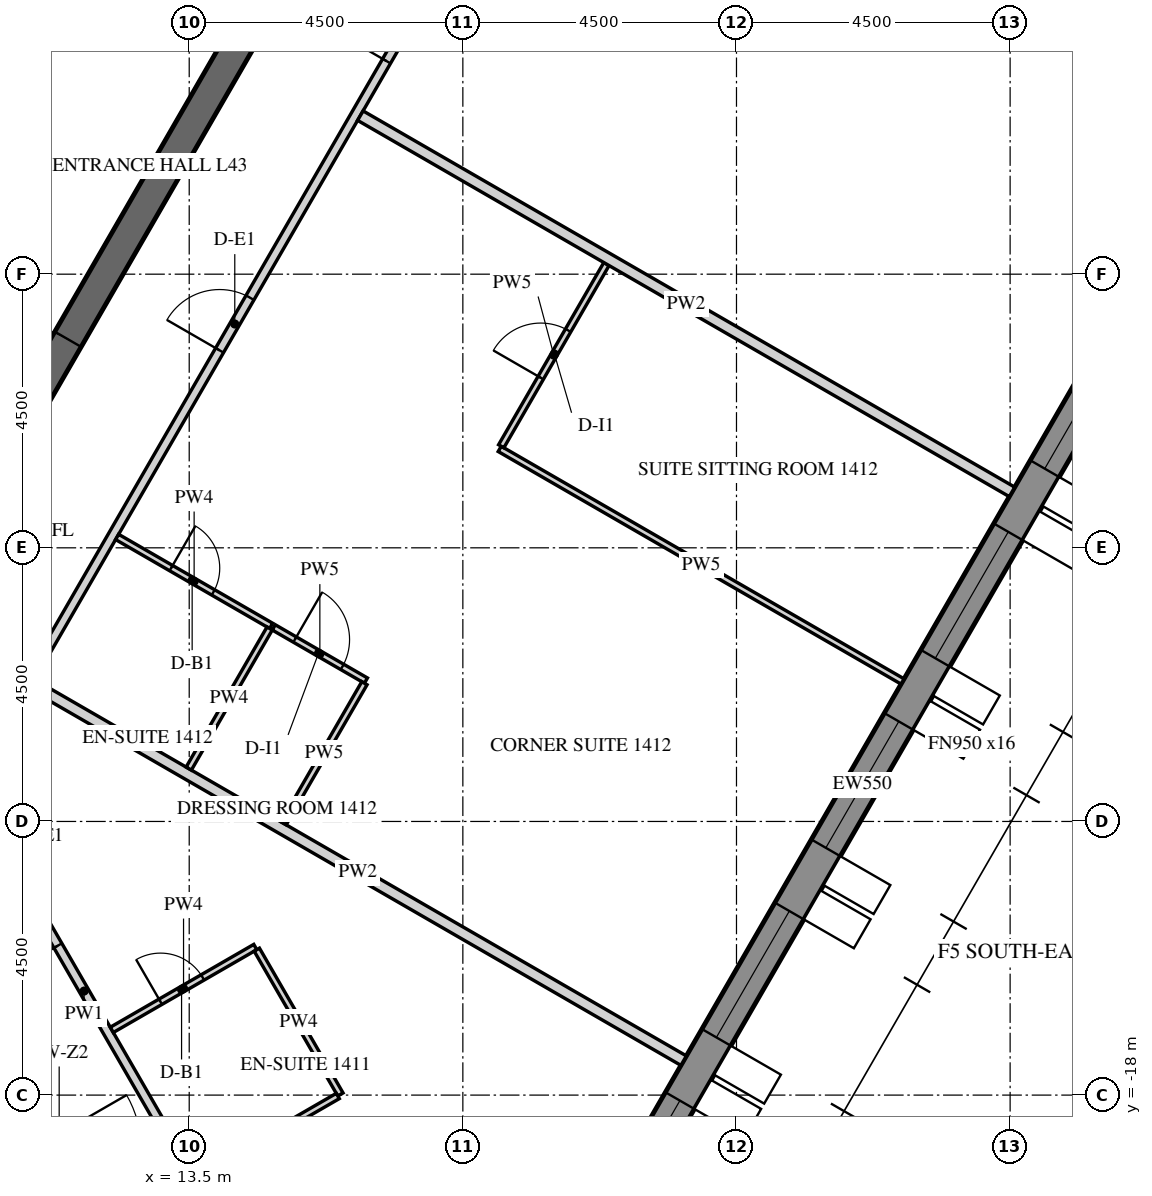
"""IFC4 building model, lengths in metres.
Left out: names, types, materials, properties, quantities, classifications, styles, units other than length and angle.
Written with IfcOpenShell. Run it as: python <this file> out.ifc"""

import sys

from ifc_helpers import new_model, si_unit, direction, frame, frame_2d, origin, place, context, subcontext, project, spatial, polyline, rectangle, outline, extrude, element, fill, save


model = new_model("IFC4")
c1 = context("Model", 3, precision=1e-05, world=origin(), true_north=direction((0.0, 1.0)))
c2 = subcontext(c1, "Body", "Model", "MODEL_VIEW")
j1 = project(units=[si_unit("LENGTHUNIT", "METRE"), si_unit("PLANEANGLEUNIT", "RADIAN")], contexts=[c1])
p1 = place(None, origin())
s1 = spatial("IfcSite", under=j1, at=p1, CompositionType="ELEMENT")
p2 = place(p1, origin())
s2 = spatial("IfcBuilding", under=s1, at=p2, CompositionType="ELEMENT")
p3 = place(p2, frame((0.0, 0.0, 183.9)))
s3 = spatial("IfcBuildingStorey", under=s2, at=p3, CompositionType="ELEMENT", Elevation=183.9)
p4 = place(p3, frame((17.63, -24.914, -0.15), z_axis=(0.0, 0.0, 1.0), x_axis=(0.499998569178, 0.866026229868, 0.0)))
e1 = element("IfcWall", 1, at=p4, inside=s3, PredefinedType="SOLIDWALL", context=c2, shape_type="SweptSolid", body=[
    extrude(outline(polyline([(-0.022, -0.275), (27.783, -0.275), (27.732, 0.275), (0.022, 0.275), (-0.022, -0.275)])), origin(), (0.0, 0.0, 1.0), 3.9),
])
p5 = place(p4, frame((1.879, 0.0, 1.05)))
e2 = element("IfcOpeningElement", 2, at=p5, cuts=e1, PredefinedType="OPENING", context=c2, shape_type="SweptSolid", body=[
    extrude(rectangle(XDim=2.4, YDim=2.4, at=frame_2d((1.2, 1.2))), frame((0.0, 0.285, 0.0), z_axis=(0.0, -1.0, 0.0), x_axis=(1.0, 0.0, 0.0)), (0.0, 0.0, 1.0), 0.57),
])
p6 = place(p4, frame((5.479, 0.0, 1.05)))
e3 = element("IfcOpeningElement", 3, at=p6, cuts=e1, PredefinedType="OPENING", context=c2, shape_type="SweptSolid", body=[
    extrude(rectangle(XDim=2.4, YDim=2.4, at=frame_2d((1.2, 1.2))), frame((0.0, 0.285, 0.0), z_axis=(0.0, -1.0, 0.0), x_axis=(1.0, 0.0, 0.0)), (0.0, 0.0, 1.0), 0.57),
])
p7 = place(p4, frame((9.079, 0.0, 1.05)))
e4 = element("IfcOpeningElement", 4, at=p7, cuts=e1, PredefinedType="OPENING", context=c2, shape_type="SweptSolid", body=[
    extrude(rectangle(XDim=2.4, YDim=2.4, at=frame_2d((1.2, 1.2))), frame((0.0, 0.285, 0.0), z_axis=(0.0, -1.0, 0.0), x_axis=(1.0, 0.0, 0.0)), (0.0, 0.0, 1.0), 0.57),
])
p8 = place(p4, frame((12.679, 0.0, 1.05)))
e5 = element("IfcOpeningElement", 5, at=p8, cuts=e1, PredefinedType="OPENING", context=c2, shape_type="SweptSolid", body=[
    extrude(rectangle(XDim=2.4, YDim=2.4, at=frame_2d((1.2, 1.2))), frame((0.0, 0.285, 0.0), z_axis=(0.0, -1.0, 0.0), x_axis=(1.0, 0.0, 0.0)), (0.0, 0.0, 1.0), 0.57),
])
p9 = place(p4, frame((16.279, 0.0, 1.05)))
e6 = element("IfcOpeningElement", 6, at=p9, cuts=e1, PredefinedType="OPENING", context=c2, shape_type="SweptSolid", body=[
    extrude(rectangle(XDim=2.4, YDim=2.4, at=frame_2d((1.2, 1.2))), frame((0.0, 0.285, 0.0), z_axis=(0.0, -1.0, 0.0), x_axis=(1.0, 0.0, 0.0)), (0.0, 0.0, 1.0), 0.57),
])
p10 = place(p4, frame((19.879, 0.0, 1.05)))
e7 = element("IfcOpeningElement", 7, at=p10, cuts=e1, PredefinedType="OPENING", context=c2, shape_type="SweptSolid", body=[
    extrude(rectangle(XDim=2.4, YDim=2.4, at=frame_2d((1.2, 1.2))), frame((0.0, 0.285, 0.0), z_axis=(0.0, -1.0, 0.0), x_axis=(1.0, 0.0, 0.0)), (0.0, 0.0, 1.0), 0.57),
])
p11 = place(p4, frame((23.479, 0.0, 1.05)))
e8 = element("IfcOpeningElement", 8, at=p11, cuts=e1, PredefinedType="OPENING", context=c2, shape_type="SweptSolid", body=[
    extrude(rectangle(XDim=2.4, YDim=2.4, at=frame_2d((1.2, 1.2))), frame((0.0, 0.285, 0.0), z_axis=(0.0, -1.0, 0.0), x_axis=(1.0, 0.0, 0.0)), (0.0, 0.0, 1.0), 0.57),
])
p12 = place(p3, frame((7.361, -12.75, -0.15), z_axis=(0.0, 0.0, 1.0), x_axis=(0.50000571537, 0.866022103989, 0.0)))
e9 = element("IfcWall", 9, at=p12, inside=s3, PredefinedType="SHEAR", context=c2, shape_type="SweptSolid", body=[
    extrude(outline(polyline([(-0.144, -0.25), (14.867, -0.25), (14.578, 0.25), (0.144, 0.25), (-0.144, -0.25)])), origin(), (0.0, 0.0, 1.0), 3.9),
])
p13 = place(p12, frame((6.49, 0.0, 0.15)))
e10 = element("IfcOpeningElement", 10, at=p13, cuts=e9, PredefinedType="OPENING", context=c2, shape_type="SweptSolid", body=[
    extrude(rectangle(XDim=1.8, YDim=2.4, at=frame_2d((0.9, 1.2))), frame((0.0, 0.26, 0.0), z_axis=(0.0, -1.0, 0.0), x_axis=(1.0, 0.0, 0.0)), (0.0, 0.0, 1.0), 0.52),
])
p14 = place(p3, frame((7.506, -13.0, -0.15), z_axis=(0.0, 0.0, 1.0), x_axis=(0.499988271576, -0.866032175087, 0.0)))
e11 = element("IfcWall", 11, at=p14, inside=s3, PredefinedType="SHEAR", context=c2, shape_type="SweptSolid", body=[
    extrude(rectangle(XDim=15.424, YDim=0.5, at=frame_2d((7.712, 0.0))), origin(), (0.0, 0.0, 1.0), 3.9),
])
p15 = place(p14, frame((6.812, 0.0, 0.15)))
e12 = element("IfcOpeningElement", 12, at=p15, cuts=e11, PredefinedType="OPENING", context=c2, shape_type="SweptSolid", body=[
    extrude(rectangle(XDim=1.8, YDim=2.4, at=frame_2d((0.9, 1.2))), frame((0.0, 0.26, 0.0), z_axis=(0.0, -1.0, 0.0), x_axis=(1.0, 0.0, 0.0)), (0.0, 0.0, 1.0), 0.52),
])
p16 = place(p3, frame((5.673, -9.825, -0.15), z_axis=(0.0, 0.0, 1.0), x_axis=(0.499995046907, 0.866028263435, 0.0)))
e13 = element("IfcWall", 13, at=p16, inside=s3, PredefinedType="SHEAR", context=c2, shape_type="SweptSolid", body=[
    extrude(outline(polyline([(-0.101, -0.175), (11.446, -0.175), (11.244, 0.175), (0.101, 0.175), (-0.101, -0.175)])), origin(), (0.0, 0.0, 1.0), 3.9),
])
p17 = place(p16, frame((4.801, 0.0, 0.15)))
e14 = element("IfcOpeningElement", 14, at=p17, cuts=e13, PredefinedType="OPENING", context=c2, shape_type="SweptSolid", body=[
    extrude(rectangle(XDim=1.8, YDim=2.4, at=frame_2d((0.9, 1.2))), frame((0.0, 0.185, 0.0), z_axis=(0.0, -1.0, 0.0), x_axis=(1.0, 0.0, 0.0)), (0.0, 0.0, 1.0), 0.37),
])
p18 = place(p3, frame((13.699, -19.628, 0.0), z_axis=(0.0, 0.0, 1.0), x_axis=(-0.499993780622, 0.866028994514, 0.0)))
e15 = element("IfcWall", 15, at=p18, inside=s3, PredefinedType="PARTITIONING", context=c2, shape_type="SweptSolid", body=[
    extrude(rectangle(XDim=7.711, YDim=0.15, at=frame_2d((3.855, 0.0))), origin(), (0.0, 0.0, 1.0), 2.988),
])
p19 = place(p18, frame((4.718, 0.0, 0.0)))
e16 = element("IfcOpeningElement", 16, at=p19, cuts=e15, PredefinedType="OPENING", context=c2, shape_type="SweptSolid", body=[
    extrude(rectangle(XDim=1.0, YDim=2.1, at=frame_2d((0.5, 1.05))), frame((0.0, 0.085, 0.0), z_axis=(0.0, -1.0, 0.0), x_axis=(1.0, 0.0, 0.0)), (0.0, 0.0, 1.0), 0.17),
])
p20 = place(p3, frame((9.887, -12.875, 0.0), z_axis=(0.0, 0.0, 1.0), x_axis=(0.499998228944, 0.866026426302, 0.0)))
e17 = element("IfcWall", 17, at=p20, inside=s3, PredefinedType="PARTITIONING", context=c2, shape_type="SweptSolid", body=[
    extrude(rectangle(XDim=14.867, YDim=0.15, at=frame_2d((7.433, 0.0))), origin(), (0.0, 0.0, 1.0), 2.988),
])
p21 = place(p20, frame((8.224, 0.0, 0.0)))
e18 = element("IfcOpeningElement", 18, at=p21, cuts=e17, PredefinedType="OPENING", context=c2, shape_type="SweptSolid", body=[
    extrude(rectangle(XDim=1.0, YDim=2.1, at=frame_2d((0.5, 1.05))), frame((0.0, 0.085, 0.0), z_axis=(0.0, -1.0, 0.0), x_axis=(1.0, 0.0, 0.0)), (0.0, 0.0, 1.0), 0.17),
])
p22 = place(p20, frame((13.717, 0.0, 0.0)))
e19 = element("IfcOpeningElement", 19, at=p22, cuts=e17, PredefinedType="OPENING", context=c2, shape_type="SweptSolid", body=[
    extrude(rectangle(XDim=1.0, YDim=2.1, at=frame_2d((0.5, 1.05))), frame((0.0, 0.085, 0.0), z_axis=(0.0, -1.0, 0.0), x_axis=(1.0, 0.0, 0.0)), (0.0, 0.0, 1.0), 0.17),
])
p23 = place(p3, frame((12.227, -16.927, 0.0), z_axis=(0.0, 0.0, 1.0), x_axis=(0.866012511928, 0.500022328685, 0.0)))
e20 = element("IfcWall", 20, at=p23, inside=s3, PredefinedType="PARTITIONING", context=c2, shape_type="SweptSolid", body=[
    extrude(rectangle(XDim=2.725, YDim=0.1, at=frame_2d((1.363, 0.0))), origin(), (0.0, 0.0, 1.0), 2.988),
])
p24 = place(p23, frame((0.925, 0.0, 0.0)))
e21 = element("IfcOpeningElement", 21, at=p24, cuts=e20, PredefinedType="OPENING", context=c2, shape_type="SweptSolid", body=[
    extrude(rectangle(XDim=0.8, YDim=2.1, at=frame_2d((0.4, 1.05))), frame((0.0, 0.06, 0.0), z_axis=(0.0, -1.0, 0.0), x_axis=(1.0, 0.0, 0.0)), (0.0, 0.0, 1.0), 0.12),
])
p25 = place(p3, frame((14.612, -15.608, 0.0), z_axis=(0.0, 0.0, 1.0), x_axis=(0.499996545922, -0.866027397988, 0.0)))
e22 = element("IfcWall", 22, at=p25, inside=s3, PredefinedType="PARTITIONING", context=c2, shape_type="SweptSolid", body=[
    extrude(rectangle(XDim=2.75, YDim=0.1, at=frame_2d((1.375, 0.0))), origin(), (0.0, 0.0, 1.0), 2.988),
])
p26 = place(p3, frame((15.943, -18.015, 0.0), z_axis=(0.0, 0.0, 1.0), x_axis=(-0.866004723184, -0.50003581814, 0.0)))
e23 = element("IfcWall", 23, at=p26, inside=s3, PredefinedType="PARTITIONING", context=c2, shape_type="SweptSolid", body=[
    extrude(rectangle(XDim=2.675, YDim=0.1, at=frame_2d((1.337, 0.0))), origin(), (0.0, 0.0, 1.0), 2.988),
])
p27 = place(p3, frame((21.631, -17.433, 0.0), z_axis=(0.0, 0.0, 1.0), x_axis=(-0.866024931941, 0.500000817256, 0.0)))
e24 = element("IfcWall", 24, at=p27, inside=s3, PredefinedType="PARTITIONING", context=c2, shape_type="SweptSolid", body=[
    extrude(rectangle(XDim=12.375, YDim=0.18, at=frame_2d((6.188, 0.0))), origin(), (0.0, 0.0, 1.0), 2.988),
])
p28 = place(p3, frame((12.314, -8.821, 0.0), z_axis=(0.0, 0.0, 1.0), x_axis=(0.866046596414, -0.499963291492, 0.0)))
e25 = element("IfcWall", 25, at=p28, inside=s3, PredefinedType="PARTITIONING", context=c2, shape_type="SweptSolid", body=[
    extrude(rectangle(XDim=2.925, YDim=0.1, at=frame_2d((1.462, 0.0))), origin(), (0.0, 0.0, 1.0), 2.988),
])
p29 = place(p28, frame((1.025, 0.0, 0.0)))
e26 = element("IfcOpeningElement", 26, at=p29, cuts=e25, PredefinedType="OPENING", context=c2, shape_type="SweptSolid", body=[
    extrude(rectangle(XDim=0.8, YDim=2.1, at=frame_2d((0.4, 1.05))), frame((0.0, 0.06, 0.0), z_axis=(0.0, -1.0, 0.0), x_axis=(1.0, 0.0, 0.0)), (0.0, 0.0, 1.0), 0.12),
])
p30 = place(p3, frame((14.891, -10.309, 0.0), z_axis=(0.0, 0.0, 1.0), x_axis=(0.866036909293, -0.499980071345, 0.0)))
e27 = element("IfcWall", 27, at=p30, inside=s3, PredefinedType="PARTITIONING", context=c2, shape_type="SweptSolid", body=[
    extrude(rectangle(XDim=1.75, YDim=0.1, at=frame_2d((0.875, 0.0))), origin(), (0.0, 0.0, 1.0), 2.988),
])
p31 = place(p30, frame((0.4, 0.0, 0.0)))
e28 = element("IfcOpeningElement", 28, at=p31, cuts=e27, PredefinedType="OPENING", context=c2, shape_type="SweptSolid", body=[
    extrude(rectangle(XDim=0.9, YDim=2.1, at=frame_2d((0.45, 1.05))), frame((0.0, 0.06, 0.0), z_axis=(0.0, -1.0, 0.0), x_axis=(1.0, 0.0, 0.0)), (0.0, 0.0, 1.0), 0.12),
])
p32 = place(p3, frame((16.381, -11.227, 0.0), z_axis=(0.0, 0.0, 1.0), x_axis=(-0.500008456887, -0.866020521143, 0.0)))
e29 = element("IfcWall", 29, at=p32, inside=s3, PredefinedType="PARTITIONING", context=c2, shape_type="SweptSolid", body=[
    extrude(rectangle(XDim=2.66, YDim=0.1, at=frame_2d((1.33, 0.0))), origin(), (0.0, 0.0, 1.0), 2.988),
])
p33 = place(p3, frame((25.231, -11.198, 0.0), z_axis=(0.0, 0.0, 1.0), x_axis=(-0.866033062874, 0.499986733834, 0.0)))
e30 = element("IfcWall", 30, at=p33, inside=s3, PredefinedType="PARTITIONING", context=c2, shape_type="SweptSolid", body=[
    extrude(rectangle(XDim=7.65, YDim=0.1, at=frame_2d((3.825, 0.0))), origin(), (0.0, 0.0, 1.0), 2.988),
])
p34 = place(p3, frame((18.631, -7.33, 0.0), z_axis=(0.0, 0.0, 1.0), x_axis=(0.499978980201, 0.866037539231, 0.0)))
e31 = element("IfcWall", 31, at=p34, inside=s3, PredefinedType="PARTITIONING", context=c2, shape_type="SweptSolid", body=[
    extrude(rectangle(XDim=3.46, YDim=0.1, at=frame_2d((1.73, 0.0))), origin(), (0.0, 0.0, 1.0), 2.988),
])
p35 = place(p34, frame((1.3, 0.0, 0.0)))
e32 = element("IfcOpeningElement", 32, at=p35, cuts=e31, PredefinedType="OPENING", context=c2, shape_type="SweptSolid", body=[
    extrude(rectangle(XDim=0.9, YDim=2.1, at=frame_2d((0.45, 1.05))), frame((0.0, 0.06, 0.0), z_axis=(0.0, -1.0, 0.0), x_axis=(1.0, 0.0, 0.0)), (0.0, 0.0, 1.0), 0.12),
])
p36 = place(p3, frame((27.031, -8.08, 0.0), z_axis=(0.0, 0.0, 1.0), x_axis=(-0.866024931941, 0.500000817256, 0.0)))
e33 = element("IfcWall", 33, at=p36, inside=s3, PredefinedType="PARTITIONING", context=c2, shape_type="SweptSolid", body=[
    extrude(rectangle(XDim=12.375, YDim=0.18, at=frame_2d((6.188, 0.0))), origin(), (0.0, 0.0, 1.0), 2.988),
])
p37 = place(p3, frame((13.492, -12.63, 0.0), z_axis=(0.0, 0.0, 1.0), x_axis=(0.50004820116, 0.865997573043, 0.0)))
e34 = element("IfcWall", 34, at=p37, inside=s3, PredefinedType="PARTITIONING", context=c2, shape_type="SweptSolid", body=[
    extrude(rectangle(XDim=2.66, YDim=0.1, at=frame_2d((1.33, 0.0))), origin(), (0.0, 0.0, 1.0), 2.988),
])
p38 = place(p6, frame((0.0, 0.205, 0.0)))
e35 = element("IfcWindow", 35, at=p38, inside=s3, PartitioningType="DOUBLE_PANEL_VERTICAL", PredefinedType="WINDOW", context=c2, shape_type="SweptSolid", body=[
    extrude(rectangle(XDim=2.4, YDim=2.4, at=frame_2d((1.2, 1.2))), frame((0.0, 0.03, 0.0), z_axis=(0.0, -1.0, 0.0), x_axis=(1.0, 0.0, 0.0)), (0.0, 0.0, 1.0), 0.06),
])
fill(e3, e35)
p39 = place(p7, frame((0.0, 0.205, 0.0)))
e36 = element("IfcWindow", 36, at=p39, inside=s3, PartitioningType="DOUBLE_PANEL_VERTICAL", PredefinedType="WINDOW", context=c2, shape_type="SweptSolid", body=[
    extrude(rectangle(XDim=2.4, YDim=2.4, at=frame_2d((1.2, 1.2))), frame((0.0, 0.03, 0.0), z_axis=(0.0, -1.0, 0.0), x_axis=(1.0, 0.0, 0.0)), (0.0, 0.0, 1.0), 0.06),
])
fill(e4, e36)
p40 = place(p8, frame((0.0, 0.205, 0.0)))
e37 = element("IfcWindow", 37, at=p40, inside=s3, PartitioningType="DOUBLE_PANEL_VERTICAL", PredefinedType="WINDOW", context=c2, shape_type="SweptSolid", body=[
    extrude(rectangle(XDim=2.4, YDim=2.4, at=frame_2d((1.2, 1.2))), frame((0.0, 0.03, 0.0), z_axis=(0.0, -1.0, 0.0), x_axis=(1.0, 0.0, 0.0)), (0.0, 0.0, 1.0), 0.06),
])
fill(e5, e37)
p41 = place(p9, frame((0.0, 0.205, 0.0)))
e38 = element("IfcWindow", 38, at=p41, inside=s3, PartitioningType="DOUBLE_PANEL_VERTICAL", PredefinedType="WINDOW", context=c2, shape_type="SweptSolid", body=[
    extrude(rectangle(XDim=2.4, YDim=2.4, at=frame_2d((1.2, 1.2))), frame((0.0, 0.03, 0.0), z_axis=(0.0, -1.0, 0.0), x_axis=(1.0, 0.0, 0.0)), (0.0, 0.0, 1.0), 0.06),
])
fill(e6, e38)
p42 = place(p10, frame((0.0, 0.205, 0.0)))
e39 = element("IfcWindow", 39, at=p42, inside=s3, PartitioningType="DOUBLE_PANEL_VERTICAL", PredefinedType="WINDOW", context=c2, shape_type="SweptSolid", body=[
    extrude(rectangle(XDim=2.4, YDim=2.4, at=frame_2d((1.2, 1.2))), frame((0.0, 0.03, 0.0), z_axis=(0.0, -1.0, 0.0), x_axis=(1.0, 0.0, 0.0)), (0.0, 0.0, 1.0), 0.06),
])
fill(e7, e39)
p43 = place(p13, origin())
e40 = element("IfcDoor", 40, at=p43, inside=s3, OperationType="DOUBLE_DOOR_SINGLE_SWING", PredefinedType="DOOR", context=c2, shape_type="SweptSolid", body=[
    extrude(rectangle(XDim=1.8, YDim=2.4, at=frame_2d((0.9, 1.2))), frame((0.0, 0.025, 0.0), z_axis=(0.0, -1.0, 0.0), x_axis=(1.0, 0.0, 0.0)), (0.0, 0.0, 1.0), 0.05),
])
fill(e10, e40)
p44 = place(p19, origin())
e41 = element("IfcDoor", 41, at=p44, inside=s3, OperationType="SINGLE_SWING_LEFT", PredefinedType="DOOR", context=c2, shape_type="SweptSolid", body=[
    extrude(rectangle(XDim=1.0, YDim=2.1, at=frame_2d((0.5, 1.05))), frame((0.0, 0.025, 0.0), z_axis=(0.0, -1.0, 0.0), x_axis=(1.0, 0.0, 0.0)), (0.0, 0.0, 1.0), 0.05),
])
fill(e16, e41)
p45 = place(p24, origin())
e42 = element("IfcDoor", 42, at=p45, inside=s3, OperationType="SINGLE_SWING_RIGHT", PredefinedType="DOOR", context=c2, shape_type="SweptSolid", body=[
    extrude(rectangle(XDim=0.8, YDim=2.1, at=frame_2d((0.4, 1.05))), frame((0.0, 0.025, 0.0), z_axis=(0.0, -1.0, 0.0), x_axis=(1.0, 0.0, 0.0)), (0.0, 0.0, 1.0), 0.05),
])
fill(e21, e42)
p46 = place(p21, origin())
e43 = element("IfcDoor", 43, at=p46, inside=s3, OperationType="SINGLE_SWING_LEFT", PredefinedType="DOOR", context=c2, shape_type="SweptSolid", body=[
    extrude(rectangle(XDim=1.0, YDim=2.1, at=frame_2d((0.5, 1.05))), frame((0.0, 0.025, 0.0), z_axis=(0.0, -1.0, 0.0), x_axis=(1.0, 0.0, 0.0)), (0.0, 0.0, 1.0), 0.05),
])
fill(e18, e43)
p47 = place(p29, origin())
e44 = element("IfcDoor", 44, at=p47, inside=s3, OperationType="SINGLE_SWING_RIGHT", PredefinedType="DOOR", context=c2, shape_type="SweptSolid", body=[
    extrude(rectangle(XDim=0.8, YDim=2.1, at=frame_2d((0.4, 1.05))), frame((0.0, 0.025, 0.0), z_axis=(0.0, -1.0, 0.0), x_axis=(1.0, 0.0, 0.0)), (0.0, 0.0, 1.0), 0.05),
])
fill(e26, e44)
p48 = place(p31, origin())
e45 = element("IfcDoor", 45, at=p48, inside=s3, OperationType="SINGLE_SWING_RIGHT", PredefinedType="DOOR", context=c2, shape_type="SweptSolid", body=[
    extrude(rectangle(XDim=0.9, YDim=2.1, at=frame_2d((0.45, 1.05))), frame((0.0, 0.025, 0.0), z_axis=(0.0, -1.0, 0.0), x_axis=(1.0, 0.0, 0.0)), (0.0, 0.0, 1.0), 0.05),
])
fill(e28, e45)
p49 = place(p35, origin())
e46 = element("IfcDoor", 46, at=p49, inside=s3, OperationType="SINGLE_SWING_RIGHT", PredefinedType="DOOR", context=c2, shape_type="SweptSolid", body=[
    extrude(rectangle(XDim=0.9, YDim=2.1, at=frame_2d((0.45, 1.05))), frame((0.0, 0.025, 0.0), z_axis=(0.0, -1.0, 0.0), x_axis=(1.0, 0.0, 0.0)), (0.0, 0.0, 1.0), 0.05),
])
fill(e32, e46)
p50 = place(p22, origin())
e47 = element("IfcDoor", 47, at=p50, inside=s3, OperationType="SINGLE_SWING_LEFT", PredefinedType="DOOR", context=c2, shape_type="SweptSolid", body=[
    extrude(rectangle(XDim=1.0, YDim=2.1, at=frame_2d((0.5, 1.05))), frame((0.0, 0.025, 0.0), z_axis=(0.0, -1.0, 0.0), x_axis=(1.0, 0.0, 0.0)), (0.0, 0.0, 1.0), 0.05),
])
fill(e19, e47)
save(model, sys.argv[1])
